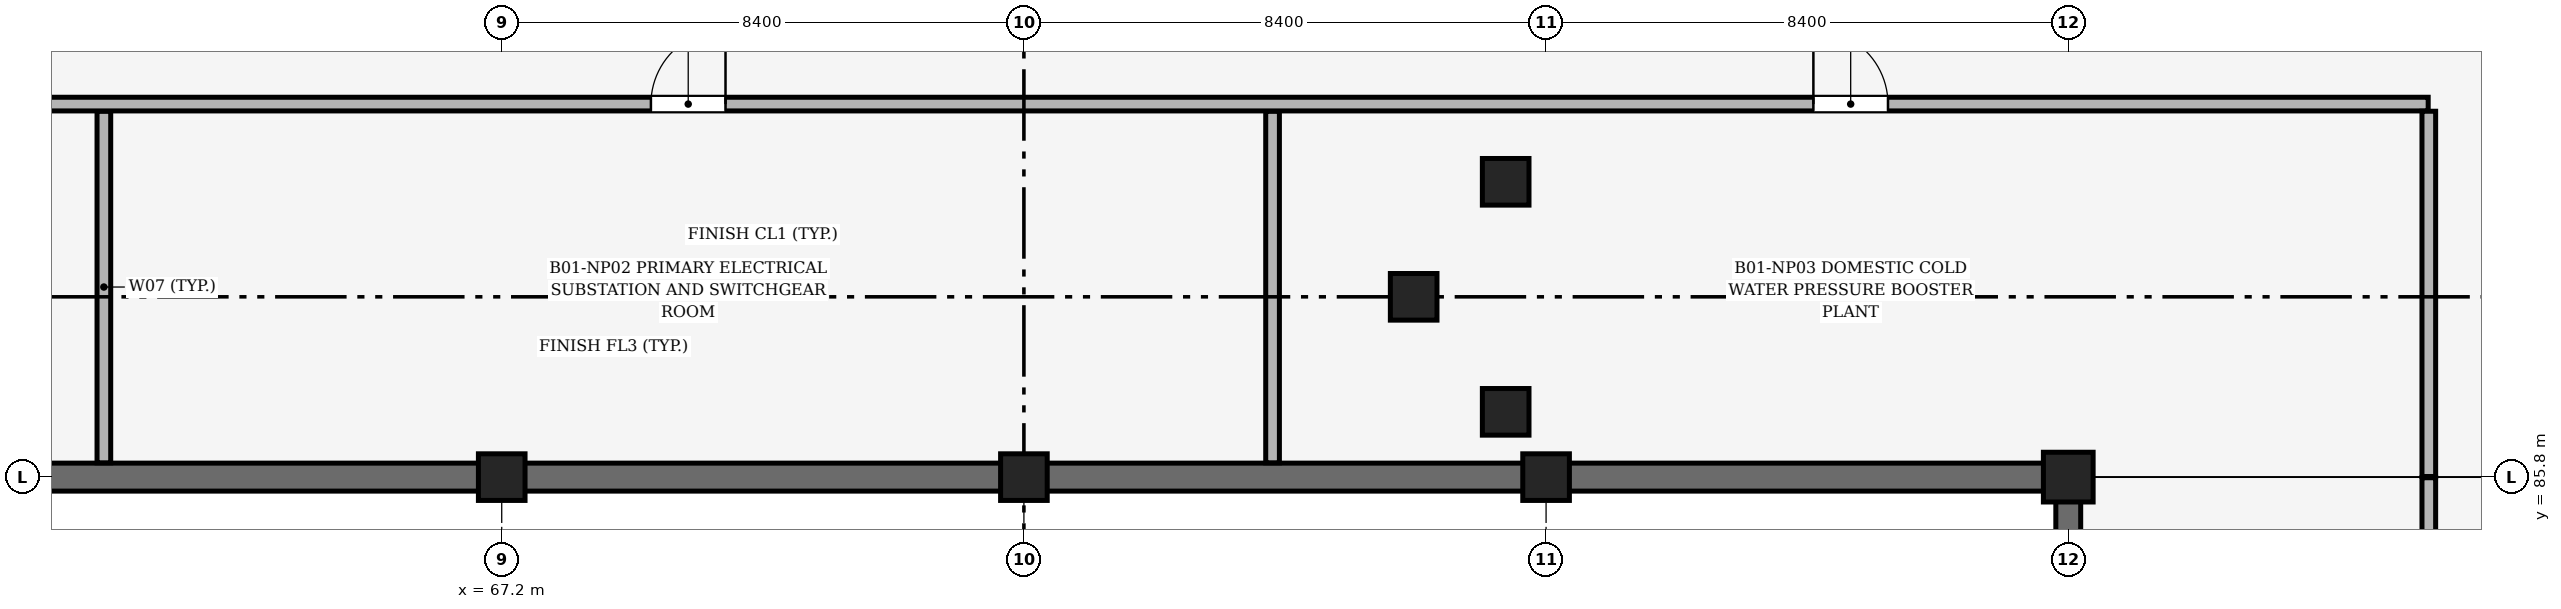
"""IFC4 building model, lengths in metres.
Left out: names, types, materials, properties, quantities, classifications, styles, units other than length and angle.
Written with IfcOpenShell. Run it as: python <this file> out.ifc"""

import sys

from ifc_helpers import new_model, si_unit, direction, frame, frame_2d, origin, origin_2d, place, context, subcontext, project, spatial, rectangle, extrude, element, fill, save


model = new_model("IFC4")
c1 = context("Model", 3, precision=1e-05, world=origin(), true_north=direction((0.0, 1.0)))
c2 = subcontext(c1, "Body", "Model", "MODEL_VIEW")
j1 = project(units=[si_unit("LENGTHUNIT", "METRE"), si_unit("PLANEANGLEUNIT", "RADIAN")], contexts=[c1])
p1 = place(None, origin())
s1 = spatial("IfcSite", under=j1, at=p1, CompositionType="ELEMENT")
p2 = place(p1, origin())
s2 = spatial("IfcBuilding", under=s1, at=p2, CompositionType="ELEMENT")
p3 = place(p2, frame((0.0, 0.0, -4.2)))
s3 = spatial("IfcBuildingStorey", under=s2, at=p3, CompositionType="ELEMENT", Elevation=-4.2)
p4 = place(p3, frame((67.2, 85.8, 0.0), z_axis=(0.0, 0.0, 1.0), x_axis=(1.0, 0.0, 0.0)))
e1 = element("IfcColumn", 1, at=p4, inside=s3, PredefinedType="COLUMN", context=c2, shape_type="SweptSolid", body=[
    extrude(rectangle(XDim=0.75, YDim=0.75, at=origin_2d()), origin(), (0.0, 0.0, 1.0), 4.2),
])
p5 = place(p3, frame((92.4, 85.8, 0.0), z_axis=(0.0, 0.0, 1.0), x_axis=(1.0, 0.0, 0.0)))
e2 = element("IfcColumn", 2, at=p5, inside=s3, PredefinedType="COLUMN", context=c2, shape_type="SweptSolid", body=[
    extrude(rectangle(XDim=0.8, YDim=0.8, at=origin_2d()), origin(), (0.0, 0.0, 1.0), 4.2),
])
for number, where, z_axis, x_axis in (
    (3, (75.6, 85.8, 0.0), (0.0, 0.0, 1.0), (1.0, 0.0, 0.0)),
    (4, (84.0, 85.8, 0.0), (0.0, 0.0, 1.0), (1.0, 0.0, 0.0)),
):
    element("IfcColumn", number, at=place(p3, frame(where, z_axis=z_axis, x_axis=x_axis)), inside=s3, PredefinedType="COLUMN", context=c2, shape_type="SweptSolid", body=[
        extrude(rectangle(XDim=0.75, YDim=0.75, at=origin_2d()), origin(), (0.0, 0.0, 1.0), 4.2),
    ])
p6 = place(p3, frame((59.15, 85.8, 0.0), z_axis=(0.0, 0.0, 1.0), x_axis=(1.0, 0.0, 0.0)))
e5 = element("IfcWall", 5, at=p6, inside=s3, PredefinedType="SHEAR", context=c2, shape_type="SweptSolid", body=[
    extrude(rectangle(XDim=7.7, YDim=0.45, at=frame_2d((3.85, 0.0))), origin(), (0.0, 0.0, 1.0), 3.2),
])
p7 = place(p3, frame((67.55, 85.8, 0.0), z_axis=(0.0, 0.0, 1.0), x_axis=(1.0, 0.0, 0.0)))
e6 = element("IfcWall", 6, at=p7, inside=s3, PredefinedType="SHEAR", context=c2, shape_type="SweptSolid", body=[
    extrude(rectangle(XDim=7.7, YDim=0.45, at=frame_2d((3.85, 0.0))), origin(), (0.0, 0.0, 1.0), 3.15),
])
p8 = place(p3, frame((75.95, 85.8, 0.0), z_axis=(0.0, 0.0, 1.0), x_axis=(1.0, 0.0, 0.0)))
e7 = element("IfcWall", 7, at=p8, inside=s3, PredefinedType="SHEAR", context=c2, shape_type="SweptSolid", body=[
    extrude(rectangle(XDim=7.7, YDim=0.45, at=frame_2d((3.85, 0.0))), origin(), (0.0, 0.0, 1.0), 3.1),
])
p9 = place(p3, frame((84.35, 85.8, 0.0), z_axis=(0.0, 0.0, 1.0), x_axis=(1.0, 0.0, 0.0)))
e8 = element("IfcWall", 8, at=p9, inside=s3, PredefinedType="SHEAR", context=c2, shape_type="SweptSolid", body=[
    extrude(rectangle(XDim=7.675, YDim=0.45, at=frame_2d((3.837, 0.0))), origin(), (0.0, 0.0, 1.0), 3.05),
])
p10 = place(p3, frame((92.4, 77.775, 0.0), z_axis=(0.0, 0.0, 1.0), x_axis=(0.0, 1.0, 0.0)))
e9 = element("IfcWall", 9, at=p10, inside=s3, PredefinedType="SHEAR", context=c2, shape_type="SweptSolid", body=[
    extrude(rectangle(XDim=7.65, YDim=0.4, at=frame_2d((3.825, 0.0))), origin(), (0.0, 0.0, 1.0), 3.05),
])
for number, where, z_axis, x_axis in (
    (10, (83.35, 86.85, 0.0), (0.0, 0.0, 1.0), (1.0, 0.0, 0.0)),
    (11, (83.35, 90.55, 0.0), (0.0, 0.0, 1.0), (1.0, 0.0, 0.0)),
    (12, (81.87, 88.7, 0.0), (0.0, 0.0, 1.0), (1.0, 0.0, 0.0)),
):
    element("IfcColumn", number, at=place(p3, frame(where, z_axis=z_axis, x_axis=x_axis)), inside=s3, PredefinedType="COLUMN", context=c2, shape_type="SweptSolid", body=[
        extrude(rectangle(XDim=0.75, YDim=0.75, at=origin_2d()), origin(), (0.0, 0.0, 1.0), 4.2),
    ])
for number, where, z_axis, x_axis in (
    (13, (60.8, 86.03, 0.0), (0.0, 0.0, 1.0), (0.0, 1.0, 0.0)),
    (14, (79.6, 86.03, 0.0), (0.0, 0.0, 1.0), (0.0, 1.0, 0.0)),
):
    element("IfcWall", number, at=place(p3, frame(where, z_axis=z_axis, x_axis=x_axis)), inside=s3, PredefinedType="SOLIDWALL", context=c2, shape_type="SweptSolid", body=[
        extrude(rectangle(XDim=5.655, YDim=0.22, at=frame_2d((2.828, 0.0))), origin(), (0.0, 0.0, 1.0), 3.9),
    ])
p11 = place(p3, frame((42.205, 91.8, 0.0), z_axis=(0.0, 0.0, 1.0), x_axis=(1.0, 0.0, 0.0)))
e15 = element("IfcWall", 15, at=p11, inside=s3, PredefinedType="SOLIDWALL", context=c2, shape_type="SweptSolid", body=[
    extrude(rectangle(XDim=55.985, YDim=0.22, at=frame_2d((27.992, 0.0))), origin(), (0.0, 0.0, 1.0), 3.9),
])
p12 = place(p11, frame((8.595, 0.0, 0.0)))
e16 = element("IfcOpeningElement", 16, at=p12, cuts=e15, PredefinedType="OPENING", context=c2, shape_type="SweptSolid", body=[
    extrude(rectangle(XDim=1.2, YDim=2.4, at=frame_2d((0.6, 1.2))), frame((0.0, 0.12, 0.0), z_axis=(0.0, -1.0, 0.0), x_axis=(1.0, 0.0, 0.0)), (0.0, 0.0, 1.0), 0.24),
])
p13 = place(p11, frame((27.395, 0.0, 0.0)))
e17 = element("IfcOpeningElement", 17, at=p13, cuts=e15, PredefinedType="OPENING", context=c2, shape_type="SweptSolid", body=[
    extrude(rectangle(XDim=1.2, YDim=2.4, at=frame_2d((0.6, 1.2))), frame((0.0, 0.12, 0.0), z_axis=(0.0, -1.0, 0.0), x_axis=(1.0, 0.0, 0.0)), (0.0, 0.0, 1.0), 0.24),
])
p14 = place(p11, frame((46.095, 0.0, 0.0)))
e18 = element("IfcOpeningElement", 18, at=p14, cuts=e15, PredefinedType="OPENING", context=c2, shape_type="SweptSolid", body=[
    extrude(rectangle(XDim=1.2, YDim=2.4, at=frame_2d((0.6, 1.2))), frame((0.0, 0.12, 0.0), z_axis=(0.0, -1.0, 0.0), x_axis=(1.0, 0.0, 0.0)), (0.0, 0.0, 1.0), 0.24),
])
p15 = place(p3, frame((98.2, 85.81, 0.0), z_axis=(0.0, 0.0, 1.0), x_axis=(0.0, 1.0, 0.0)))
e19 = element("IfcWall", 19, at=p15, inside=s3, PredefinedType="SOLIDWALL", context=c2, shape_type="SweptSolid", body=[
    extrude(rectangle(XDim=5.875, YDim=0.22, at=frame_2d((2.938, 0.0))), origin(), (0.0, 0.0, 1.0), 3.9),
])
p16 = place(p3, frame((98.2, 44.005, 0.0), z_axis=(0.0, 0.0, 1.0), x_axis=(0.0, 1.0, 0.0)))
e20 = element("IfcWall", 20, at=p16, inside=s3, PredefinedType="SOLIDWALL", context=c2, shape_type="SweptSolid", body=[
    extrude(rectangle(XDim=41.785, YDim=0.22, at=frame_2d((20.893, 0.0))), origin(), (0.0, 0.0, 1.0), 3.9),
])
p17 = place(p16, frame((6.295, 0.0, 0.0)))
e21 = element("IfcOpeningElement", 21, at=p17, cuts=e20, PredefinedType="OPENING", context=c2, shape_type="SweptSolid", body=[
    extrude(rectangle(XDim=1.2, YDim=2.4, at=frame_2d((0.6, 1.2))), frame((0.0, 0.12, 0.0), z_axis=(0.0, -1.0, 0.0), x_axis=(1.0, 0.0, 0.0)), (0.0, 0.0, 1.0), 0.24),
])
p18 = place(p16, frame((20.445, 0.0, 0.0)))
e22 = element("IfcOpeningElement", 22, at=p18, cuts=e20, PredefinedType="OPENING", context=c2, shape_type="SweptSolid", body=[
    extrude(rectangle(XDim=1.1, YDim=2.15, at=frame_2d((0.55, 1.075))), frame((0.0, 0.12, 0.0), z_axis=(0.0, -1.0, 0.0), x_axis=(1.0, 0.0, 0.0)), (0.0, 0.0, 1.0), 0.24),
])
p19 = place(p16, frame((34.345, 0.0, 0.0)))
e23 = element("IfcOpeningElement", 23, at=p19, cuts=e20, PredefinedType="OPENING", context=c2, shape_type="SweptSolid", body=[
    extrude(rectangle(XDim=1.1, YDim=2.15, at=frame_2d((0.55, 1.075))), frame((0.0, 0.12, 0.0), z_axis=(0.0, -1.0, 0.0), x_axis=(1.0, 0.0, 0.0)), (0.0, 0.0, 1.0), 0.24),
])
p20 = place(p13, origin())
e24 = element("IfcDoor", 24, at=p20, inside=s3, OperationType="SINGLE_SWING_RIGHT", PredefinedType="DOOR", context=c2, shape_type="SweptSolid", body=[
    extrude(rectangle(XDim=1.2, YDim=2.4, at=frame_2d((0.6, 1.2))), frame((0.0, 0.025, 0.0), z_axis=(0.0, -1.0, 0.0), x_axis=(1.0, 0.0, 0.0)), (0.0, 0.0, 1.0), 0.05),
])
fill(e17, e24)
p21 = place(p14, origin())
e25 = element("IfcDoor", 25, at=p21, inside=s3, OperationType="SINGLE_SWING_LEFT", PredefinedType="DOOR", context=c2, shape_type="SweptSolid", body=[
    extrude(rectangle(XDim=1.2, YDim=2.4, at=frame_2d((0.6, 1.2))), frame((0.0, 0.025, 0.0), z_axis=(0.0, -1.0, 0.0), x_axis=(1.0, 0.0, 0.0)), (0.0, 0.0, 1.0), 0.05),
])
fill(e18, e25)
save(model, sys.argv[1])
